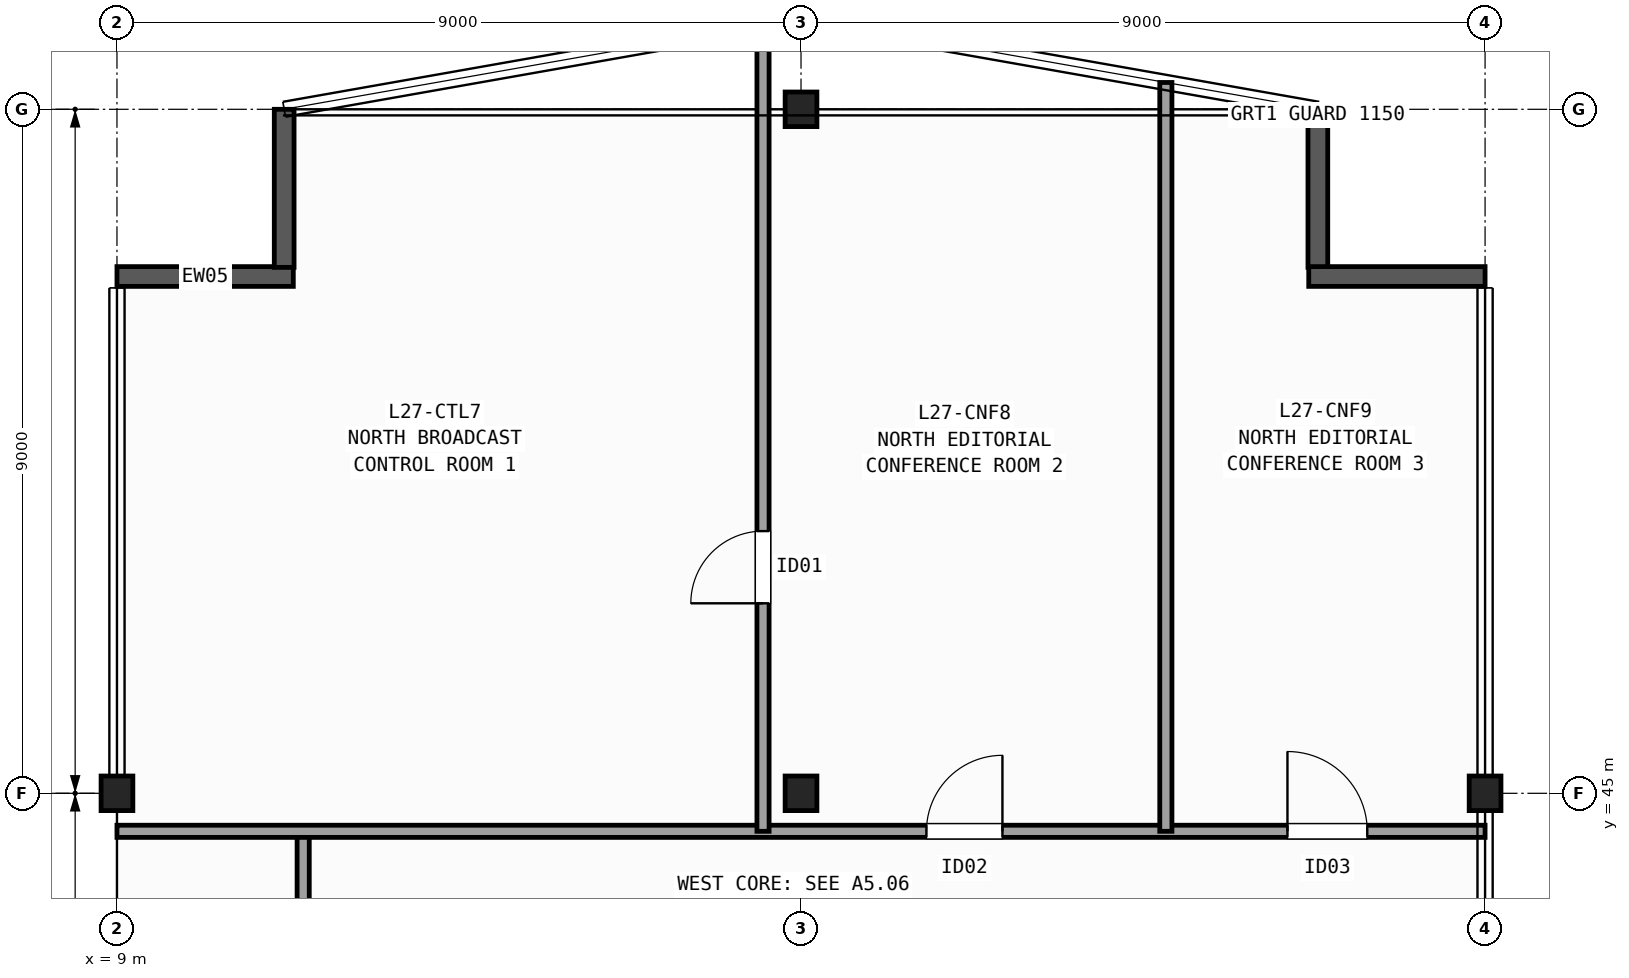
"""IFC4 building model, lengths in metres.
Left out: names, types, materials, properties, quantities, classifications, styles, units other than length and angle.
Written with IfcOpenShell. Run it as: python <this file> out.ifc"""

import sys

from ifc_helpers import new_model, si_unit, direction, frame, frame_2d, origin, origin_2d, place, context, subcontext, project, spatial, rectangle, i_section, extrude, element, fill, save


model = new_model("IFC4")
c1 = context("Model", 3, precision=1e-05, world=origin(), true_north=direction((0.0, 1.0)))
c2 = subcontext(c1, "Body", "Model", "MODEL_VIEW")
j1 = project(units=[si_unit("LENGTHUNIT", "METRE"), si_unit("PLANEANGLEUNIT", "RADIAN")], contexts=[c1])
p1 = place(None, origin())
s1 = spatial("IfcSite", under=j1, at=p1, CompositionType="ELEMENT")
p2 = place(p1, origin())
s2 = spatial("IfcBuilding", under=s1, at=p2, CompositionType="ELEMENT")
p3 = place(p2, frame((0.0, 0.0, 113.7)))
s3 = spatial("IfcBuildingStorey", under=s2, at=p3, CompositionType="ELEMENT", Elevation=113.7)
for number, where, z_axis, x_axis in (
    (1, (9.0, 45.0, 0.0), (0.0, 0.0, 1.0), (1.0, 0.0, 0.0)),
    (2, (18.0, 45.0, 0.0), (0.0, 0.0, 1.0), (1.0, 0.0, 0.0)),
    (3, (18.0, 54.0, 0.0), (0.0, 0.0, 1.0), (1.0, 0.0, 0.0)),
    (4, (27.0, 45.0, 0.0), (0.0, 0.0, 1.0), (1.0, 0.0, 0.0)),
):
    element("IfcColumn", number, at=place(p3, frame(where, z_axis=z_axis, x_axis=x_axis)), inside=s3, PredefinedType="COLUMN", context=c2, shape_type="SweptSolid", body=[
        extrude(i_section(OverallWidth=0.418, OverallDepth=0.455, WebThickness=0.042, FlangeThickness=0.068, FilletRadius=0.015, at=origin_2d()), origin(), (0.0, 0.0, 1.0), 3.7),
    ])
p4 = place(p3, frame((9.0, 51.8, 0.0), z_axis=(0.0, 0.0, 1.0), x_axis=(1.0, 0.0, 0.0)))
e5 = element("IfcWall", 5, at=p4, inside=s3, PredefinedType="SOLIDWALL", context=c2, shape_type="SweptSolid", body=[
    extrude(rectangle(XDim=2.32, YDim=0.26, at=frame_2d((1.16, 0.0))), origin(), (0.0, 0.0, 1.0), 3.42),
])
for number, where, z_axis, x_axis in (
    (6, (11.2, 51.92, 0.0), (0.0, 0.0, 1.0), (0.0, 1.0, 0.0)),
    (7, (24.8, 54.0, 0.0), (0.0, 0.0, 1.0), (0.0, -1.0, 0.0)),
):
    element("IfcWall", number, at=place(p3, frame(where, z_axis=z_axis, x_axis=x_axis)), inside=s3, PredefinedType="SOLIDWALL", context=c2, shape_type="SweptSolid", body=[
        extrude(rectangle(XDim=2.08, YDim=0.26, at=frame_2d((1.04, 0.0))), origin(), (0.0, 0.0, 1.0), 3.42),
    ])
p5 = place(p3, frame((24.68, 51.8, 0.0), z_axis=(0.0, 0.0, 1.0), x_axis=(1.0, 0.0, 0.0)))
e8 = element("IfcWall", 8, at=p5, inside=s3, PredefinedType="SOLIDWALL", context=c2, shape_type="SweptSolid", body=[
    extrude(rectangle(XDim=2.32, YDim=0.26, at=frame_2d((1.16, 0.0))), origin(), (0.0, 0.0, 1.0), 3.42),
])
p6 = place(p3, frame((11.45, 42.4, 0.0), z_axis=(0.0, 0.0, 1.0), x_axis=(0.0, 1.0, 0.0)))
e9 = element("IfcWall", 9, at=p6, inside=s3, PredefinedType="PARTITIONING", context=c2, shape_type="SweptSolid", body=[
    extrude(rectangle(XDim=2.1, YDim=0.16, at=frame_2d((1.05, 0.0))), origin(), (0.0, 0.0, 1.0), 3.42),
])
p7 = place(p3, frame((9.0, 44.5, 0.0), z_axis=(0.0, 0.0, 1.0), x_axis=(1.0, 0.0, 0.0)))
e10 = element("IfcWall", 10, at=p7, inside=s3, PredefinedType="PARTITIONING", context=c2, shape_type="SweptSolid", body=[
    extrude(rectangle(XDim=18.0, YDim=0.16, at=frame_2d((9.0, 0.0))), origin(), (0.0, 0.0, 1.0), 2.634),
])
p8 = place(p7, frame((10.65, 0.0, 0.0)))
e11 = element("IfcOpeningElement", 11, at=p8, cuts=e10, PredefinedType="OPENING", context=c2, shape_type="SweptSolid", body=[
    extrude(rectangle(XDim=1.0, YDim=2.1, at=frame_2d((0.5, 1.05))), frame((0.0, 0.09, 0.0), z_axis=(0.0, -1.0, 0.0), x_axis=(1.0, 0.0, 0.0)), (0.0, 0.0, 1.0), 0.18),
])
p9 = place(p7, frame((15.4, 0.0, 0.0)))
e12 = element("IfcOpeningElement", 12, at=p9, cuts=e10, PredefinedType="OPENING", context=c2, shape_type="SweptSolid", body=[
    extrude(rectangle(XDim=1.05, YDim=2.15, at=frame_2d((0.525, 1.075))), frame((0.0, 0.09, 0.0), z_axis=(0.0, -1.0, 0.0), x_axis=(1.0, 0.0, 0.0)), (0.0, 0.0, 1.0), 0.18),
])
p10 = place(p3, frame((17.5, 44.5, 0.0), z_axis=(0.0, 0.0, 1.0), x_axis=(0.0, 1.0, 0.0)))
e13 = element("IfcWall", 13, at=p10, inside=s3, PredefinedType="PARTITIONING", context=c2, shape_type="SweptSolid", body=[
    extrude(rectangle(XDim=10.612, YDim=0.16, at=frame_2d((5.306, 0.0))), origin(), (0.0, 0.0, 1.0), 3.42),
])
p11 = place(p10, frame((3.0, 0.0, 0.0)))
e14 = element("IfcOpeningElement", 14, at=p11, cuts=e13, PredefinedType="OPENING", context=c2, shape_type="SweptSolid", body=[
    extrude(rectangle(XDim=0.95, YDim=2.1, at=frame_2d((0.475, 1.05))), frame((0.0, 0.09, 0.0), z_axis=(0.0, -1.0, 0.0), x_axis=(1.0, 0.0, 0.0)), (0.0, 0.0, 1.0), 0.18),
])
p12 = place(p3, frame((22.8, 44.5, 0.0), z_axis=(0.0, 0.0, 1.0), x_axis=(0.0, 1.0, 0.0)))
e15 = element("IfcWall", 15, at=p12, inside=s3, PredefinedType="PARTITIONING", context=c2, shape_type="SweptSolid", body=[
    extrude(rectangle(XDim=9.853, YDim=0.16, at=frame_2d((4.927, 0.0))), origin(), (0.0, 0.0, 1.0), 3.42),
])
p13 = place(p11, origin())
e16 = element("IfcDoor", 16, at=p13, inside=s3, OperationType="SINGLE_SWING_LEFT", PredefinedType="DOOR", context=c2, shape_type="SweptSolid", body=[
    extrude(rectangle(XDim=0.95, YDim=2.1, at=frame_2d((0.475, 1.05))), frame((0.0, 0.025, 0.0), z_axis=(0.0, -1.0, 0.0), x_axis=(1.0, 0.0, 0.0)), (0.0, 0.0, 1.0), 0.05),
])
fill(e14, e16)
p14 = place(p8, origin())
e17 = element("IfcDoor", 17, at=p14, inside=s3, OperationType="SINGLE_SWING_RIGHT", PredefinedType="DOOR", context=c2, shape_type="SweptSolid", body=[
    extrude(rectangle(XDim=1.0, YDim=2.1, at=frame_2d((0.5, 1.05))), frame((0.0, 0.025, 0.0), z_axis=(0.0, -1.0, 0.0), x_axis=(1.0, 0.0, 0.0)), (0.0, 0.0, 1.0), 0.05),
])
fill(e11, e17)
p15 = place(p9, origin())
e18 = element("IfcDoor", 18, at=p15, inside=s3, OperationType="SINGLE_SWING_LEFT", PredefinedType="DOOR", context=c2, shape_type="SweptSolid", body=[
    extrude(rectangle(XDim=1.05, YDim=2.15, at=frame_2d((0.525, 1.075))), frame((0.0, 0.025, 0.0), z_axis=(0.0, -1.0, 0.0), x_axis=(1.0, 0.0, 0.0)), (0.0, 0.0, 1.0), 0.05),
])
fill(e12, e18)
save(model, sys.argv[1])
